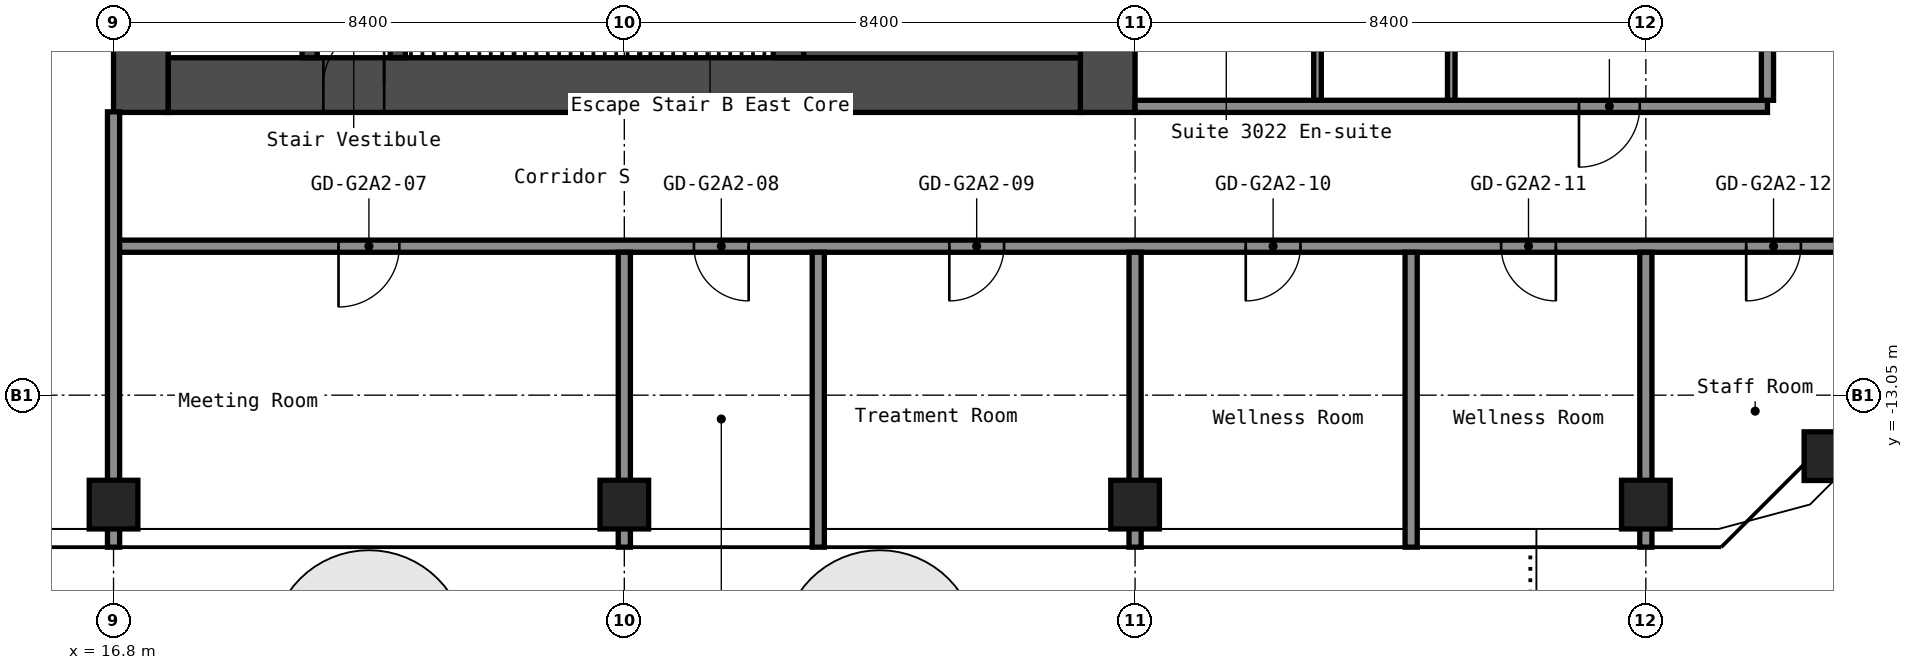
"""IFC4 building model, lengths in metres.
Left out: names, types, materials, properties, quantities, classifications, styles, units other than length and angle.
Written with IfcOpenShell. Run it as: python <this file> out.ifc"""

import sys

from ifc_helpers import new_model, si_unit, direction, frame, frame_2d, origin, origin_2d, place, context, subcontext, project, spatial, rectangle, hollow_rectangle, extrude, element, fill, save


model = new_model("IFC4")
c1 = context("Model", 3, precision=1e-05, world=origin(), true_north=direction((0.0, 1.0)))
c2 = subcontext(c1, "Body", "Model", "MODEL_VIEW")
j1 = project(units=[si_unit("LENGTHUNIT", "METRE"), si_unit("PLANEANGLEUNIT", "RADIAN")], contexts=[c1])
p1 = place(None, origin())
s1 = spatial("IfcSite", under=j1, at=p1, CompositionType="ELEMENT")
p2 = place(p1, origin())
s2 = spatial("IfcBuilding", under=s1, at=p2, CompositionType="ELEMENT")
p3 = place(p2, frame((0.0, 0.0, 107.4)))
s3 = spatial("IfcBuildingStorey", under=s2, at=p3, CompositionType="ELEMENT", Elevation=107.4)
for number, where, z_axis, x_axis in (
    (1, (16.8, -14.85, 0.0), (0.0, 0.0, 1.0), (1.0, 0.0, 0.0)),
    (2, (25.2, -14.85, 0.0), (0.0, 0.0, 1.0), (1.0, 0.0, 0.0)),
    (3, (33.6, -14.85, 0.0), (0.0, 0.0, 1.0), (1.0, 0.0, 0.0)),
    (4, (42.0, -14.85, 0.0), (0.0, 0.0, 1.0), (1.0, 0.0, 0.0)),
    (5, (45.003, -14.053, 0.0), (0.0, 0.0, 1.0), (1.0, 0.0, 0.0)),
):
    element("IfcColumn", number, at=place(p3, frame(where, z_axis=z_axis, x_axis=x_axis)), inside=s3, PredefinedType="COLUMN", context=c2, shape_type="SweptSolid", body=[
        extrude(hollow_rectangle(XDim=0.8, YDim=0.8, WallThickness=0.032, at=origin_2d()), origin(), (0.0, 0.0, 1.0), 2.8),
    ])
p4 = place(p3, frame((17.25, -8.4, 0.0), z_axis=(0.0, 0.0, 1.0), x_axis=(0.0, 1.0, 0.0)))
e6 = element("IfcWall", 6, at=p4, inside=s3, PredefinedType="SHEAR", context=c2, shape_type="SweptSolid", body=[
    extrude(rectangle(XDim=16.8, YDim=0.9, at=frame_2d((8.4, 0.0))), origin(), (0.0, 0.0, 1.0), 2.8),
])
p5 = place(p4, frame((7.6, 0.0, 0.0)))
e7 = element("IfcOpeningElement", 7, at=p5, cuts=e6, PredefinedType="OPENING", context=c2, shape_type="SweptSolid", body=[
    extrude(rectangle(XDim=1.2, YDim=2.1, at=frame_2d((0.6, 1.05))), frame((0.0, 0.46, 0.0), z_axis=(0.0, -1.0, 0.0), x_axis=(1.0, 0.0, 0.0)), (0.0, 0.0, 1.0), 0.92),
])
p6 = place(p3, frame((33.15, -8.4, 0.0), z_axis=(0.0, 0.0, 1.0), x_axis=(0.0, 1.0, 0.0)))
e8 = element("IfcWall", 8, at=p6, inside=s3, PredefinedType="SHEAR", context=c2, shape_type="SweptSolid", body=[
    extrude(rectangle(XDim=16.8, YDim=0.9, at=frame_2d((8.4, 0.0))), origin(), (0.0, 0.0, 1.0), 2.8),
])
p7 = place(p3, frame((17.7, -7.95, 0.0), z_axis=(0.0, 0.0, 1.0), x_axis=(1.0, 0.0, 0.0)))
e9 = element("IfcWall", 9, at=p7, inside=s3, PredefinedType="SHEAR", context=c2, shape_type="SweptSolid", body=[
    extrude(rectangle(XDim=15.0, YDim=0.9, at=frame_2d((7.5, 0.0))), origin(), (0.0, 0.0, 1.0), 2.8),
])
p8 = place(p7, frame((2.55, 0.0, 0.0)))
e10 = element("IfcOpeningElement", 10, at=p8, cuts=e9, PredefinedType="OPENING", context=c2, shape_type="SweptSolid", body=[
    extrude(rectangle(XDim=1.0, YDim=2.1, at=frame_2d((0.5, 1.05))), frame((0.0, 0.46, 0.0), z_axis=(0.0, -1.0, 0.0), x_axis=(1.0, 0.0, 0.0)), (0.0, 0.0, 1.0), 0.92),
])
p9 = place(p3, frame((20.025, -7.5, 0.0), z_axis=(0.0, 0.0, 1.0), x_axis=(0.0, 1.0, 0.0)))
e11 = element("IfcWall", 11, at=p9, inside=s3, PredefinedType="SHEAR", context=c2, shape_type="SweptSolid", body=[
    extrude(rectangle(XDim=6.3, YDim=0.25, at=frame_2d((3.15, 0.0))), origin(), (0.0, 0.0, 1.0), 2.8),
])
p10 = place(p9, frame((2.4, 0.0, 0.0)))
e12 = element("IfcOpeningElement", 12, at=p10, cuts=e11, PredefinedType="OPENING", context=c2, shape_type="SweptSolid", body=[
    extrude(rectangle(XDim=1.0, YDim=2.1, at=frame_2d((0.5, 1.05))), frame((0.0, 0.135, 0.0), z_axis=(0.0, -1.0, 0.0), x_axis=(1.0, 0.0, 0.0)), (0.0, 0.0, 1.0), 0.27),
])
p11 = place(p3, frame((21.475, -7.5, 0.0), z_axis=(0.0, 0.0, 1.0), x_axis=(0.0, 1.0, 0.0)))
e13 = element("IfcWall", 13, at=p11, inside=s3, PredefinedType="SHEAR", context=c2, shape_type="SweptSolid", body=[
    extrude(rectangle(XDim=3.75, YDim=0.25, at=frame_2d((1.875, 0.0))), origin(), (0.0, 0.0, 1.0), 2.8),
])
p12 = place(p11, frame((1.3, 0.0, 0.0)))
e14 = element("IfcOpeningElement", 14, at=p12, cuts=e13, PredefinedType="OPENING", context=c2, shape_type="SweptSolid", body=[
    extrude(rectangle(XDim=1.2, YDim=2.1, at=frame_2d((0.6, 1.05))), frame((0.0, 0.135, 0.0), z_axis=(0.0, -1.0, 0.0), x_axis=(1.0, 0.0, 0.0)), (0.0, 0.0, 1.0), 0.27),
])
p13 = place(p3, frame((27.9, -7.5, 0.0), z_axis=(0.0, 0.0, 1.0), x_axis=(0.0, 1.0, 0.0)))
e15 = element("IfcWall", 15, at=p13, inside=s3, PredefinedType="SHEAR", context=c2, shape_type="SweptSolid", body=[
    extrude(rectangle(XDim=3.75, YDim=0.5, at=frame_2d((1.875, 0.0))), origin(), (0.0, 0.0, 1.0), 2.8),
])
p14 = place(p3, frame((28.15, -6.75, 0.0), z_axis=(0.0, 0.0, 1.0), x_axis=(1.0, 0.0, 0.0)))
e16 = element("IfcWall", 16, at=p14, inside=s3, PredefinedType="SHEAR", context=c2, shape_type="SweptSolid", body=[
    extrude(rectangle(XDim=4.55, YDim=1.5, at=frame_2d((2.275, 0.0))), origin(), (0.0, 0.0, 1.0), 2.8),
])
p15 = place(p3, frame((16.8, -10.6, 0.0), z_axis=(0.0, 0.0, 1.0), x_axis=(1.0, 0.0, 0.0)))
e17 = element("IfcWall", 17, at=p15, inside=s3, PredefinedType="PARTITIONING", context=c2, shape_type="SweptSolid", body=[
    extrude(rectangle(XDim=29.7, YDim=0.2, at=frame_2d((14.85, 0.0))), origin(), (0.0, 0.0, 1.0), 2.8),
])
p16 = place(p15, frame((3.7, 0.0, 0.0)))
e18 = element("IfcOpeningElement", 18, at=p16, cuts=e17, PredefinedType="OPENING", context=c2, shape_type="SweptSolid", body=[
    extrude(rectangle(XDim=1.0, YDim=2.1, at=frame_2d((0.5, 1.05))), frame((0.0, 0.11, 0.0), z_axis=(0.0, -1.0, 0.0), x_axis=(1.0, 0.0, 0.0)), (0.0, 0.0, 1.0), 0.22),
])
p17 = place(p15, frame((9.545, 0.0, 0.0)))
e19 = element("IfcOpeningElement", 19, at=p17, cuts=e17, PredefinedType="OPENING", context=c2, shape_type="SweptSolid", body=[
    extrude(rectangle(XDim=0.9, YDim=2.1, at=frame_2d((0.45, 1.05))), frame((0.0, 0.11, 0.0), z_axis=(0.0, -1.0, 0.0), x_axis=(1.0, 0.0, 0.0)), (0.0, 0.0, 1.0), 0.22),
])
p18 = place(p15, frame((13.745, 0.0, 0.0)))
e20 = element("IfcOpeningElement", 20, at=p18, cuts=e17, PredefinedType="OPENING", context=c2, shape_type="SweptSolid", body=[
    extrude(rectangle(XDim=0.9, YDim=2.1, at=frame_2d((0.45, 1.05))), frame((0.0, 0.11, 0.0), z_axis=(0.0, -1.0, 0.0), x_axis=(1.0, 0.0, 0.0)), (0.0, 0.0, 1.0), 0.22),
])
p19 = place(p15, frame((18.62, 0.0, 0.0)))
e21 = element("IfcOpeningElement", 21, at=p19, cuts=e17, PredefinedType="OPENING", context=c2, shape_type="SweptSolid", body=[
    extrude(rectangle(XDim=0.9, YDim=2.1, at=frame_2d((0.45, 1.05))), frame((0.0, 0.11, 0.0), z_axis=(0.0, -1.0, 0.0), x_axis=(1.0, 0.0, 0.0)), (0.0, 0.0, 1.0), 0.22),
])
p20 = place(p15, frame((22.82, 0.0, 0.0)))
e22 = element("IfcOpeningElement", 22, at=p20, cuts=e17, PredefinedType="OPENING", context=c2, shape_type="SweptSolid", body=[
    extrude(rectangle(XDim=0.9, YDim=2.1, at=frame_2d((0.45, 1.05))), frame((0.0, 0.11, 0.0), z_axis=(0.0, -1.0, 0.0), x_axis=(1.0, 0.0, 0.0)), (0.0, 0.0, 1.0), 0.22),
])
p21 = place(p15, frame((26.85, 0.0, 0.0)))
e23 = element("IfcOpeningElement", 23, at=p21, cuts=e17, PredefinedType="OPENING", context=c2, shape_type="SweptSolid", body=[
    extrude(rectangle(XDim=0.9, YDim=2.1, at=frame_2d((0.45, 1.05))), frame((0.0, 0.11, 0.0), z_axis=(0.0, -1.0, 0.0), x_axis=(1.0, 0.0, 0.0)), (0.0, 0.0, 1.0), 0.22),
])
p22 = place(p3, frame((33.6, -8.3, 0.0), z_axis=(0.0, 0.0, 1.0), x_axis=(1.0, 0.0, 0.0)))
e24 = element("IfcWall", 24, at=p22, inside=s3, PredefinedType="PARTITIONING", context=c2, shape_type="SweptSolid", body=[
    extrude(rectangle(XDim=10.4, YDim=0.2, at=frame_2d((5.2, 0.0))), origin(), (0.0, 0.0, 1.0), 2.8),
])
p23 = place(p22, frame((7.3, 0.0, 0.0)))
e25 = element("IfcOpeningElement", 25, at=p23, cuts=e24, PredefinedType="OPENING", context=c2, shape_type="SweptSolid", body=[
    extrude(rectangle(XDim=1.0, YDim=2.1, at=frame_2d((0.5, 1.05))), frame((0.0, 0.11, 0.0), z_axis=(0.0, -1.0, 0.0), x_axis=(1.0, 0.0, 0.0)), (0.0, 0.0, 1.0), 0.22),
])
p24 = place(p3, frame((16.8, -15.55, 0.0), z_axis=(0.0, 0.0, 1.0), x_axis=(0.0, 1.0, 0.0)))
e26 = element("IfcWall", 26, at=p24, inside=s3, PredefinedType="PARTITIONING", context=c2, shape_type="SweptSolid", body=[
    extrude(rectangle(XDim=7.16, YDim=0.2, at=frame_2d((3.58, 0.0))), origin(), (0.0, 0.0, 1.0), 2.8),
])
for number, where, z_axis, x_axis in (
    (27, (25.2, -15.55, 0.0), (0.0, 0.0, 1.0), (0.0, 1.0, 0.0)),
    (28, (28.39, -15.55, 0.0), (0.0, 0.0, 1.0), (0.0, 1.0, 0.0)),
    (29, (33.6, -15.55, 0.0), (0.0, 0.0, 1.0), (0.0, 1.0, 0.0)),
):
    element("IfcWall", number, at=place(p3, frame(where, z_axis=z_axis, x_axis=x_axis)), inside=s3, PredefinedType="PARTITIONING", context=c2, shape_type="SweptSolid", body=[
        extrude(rectangle(XDim=4.85, YDim=0.2, at=frame_2d((2.425, 0.0))), origin(), (0.0, 0.0, 1.0), 2.8),
    ])
p25 = place(p3, frame((36.6, -8.2, 0.0), z_axis=(0.0, 0.0, 1.0), x_axis=(0.0, 1.0, 0.0)))
e30 = element("IfcWall", 30, at=p25, inside=s3, PredefinedType="PARTITIONING", context=c2, shape_type="SweptSolid", body=[
    extrude(rectangle(XDim=3.1, YDim=0.125, at=frame_2d((1.55, 0.0))), origin(), (0.0, 0.0, 1.0), 2.8),
])
p26 = place(p3, frame((38.14, -15.55, 0.0), z_axis=(0.0, 0.0, 1.0), x_axis=(0.0, 1.0, 0.0)))
e31 = element("IfcWall", 31, at=p26, inside=s3, PredefinedType="PARTITIONING", context=c2, shape_type="SweptSolid", body=[
    extrude(rectangle(XDim=4.85, YDim=0.2, at=frame_2d((2.425, 0.0))), origin(), (0.0, 0.0, 1.0), 2.8),
])
p27 = place(p3, frame((38.8, -8.2, 0.0), z_axis=(0.0, 0.0, 1.0), x_axis=(0.0, 1.0, 0.0)))
e32 = element("IfcWall", 32, at=p27, inside=s3, PredefinedType="PARTITIONING", context=c2, shape_type="SweptSolid", body=[
    extrude(rectangle(XDim=16.4, YDim=0.125, at=frame_2d((8.2, 0.0))), origin(), (0.0, 0.0, 1.0), 2.8),
])
p28 = place(p27, frame((4.05, 0.0, 0.0)))
e33 = element("IfcOpeningElement", 33, at=p28, cuts=e32, PredefinedType="OPENING", context=c2, shape_type="SweptSolid", body=[
    extrude(rectangle(XDim=0.9, YDim=2.1, at=frame_2d((0.45, 1.05))), frame((0.0, 0.073, 0.0), z_axis=(0.0, -1.0, 0.0), x_axis=(1.0, 0.0, 0.0)), (0.0, 0.0, 1.0), 0.145),
])
p29 = place(p27, frame((11.45, 0.0, 0.0)))
e34 = element("IfcOpeningElement", 34, at=p29, cuts=e32, PredefinedType="OPENING", context=c2, shape_type="SweptSolid", body=[
    extrude(rectangle(XDim=0.9, YDim=2.1, at=frame_2d((0.45, 1.05))), frame((0.0, 0.073, 0.0), z_axis=(0.0, -1.0, 0.0), x_axis=(1.0, 0.0, 0.0)), (0.0, 0.0, 1.0), 0.145),
])
p30 = place(p3, frame((42.0, -15.55, 0.0), z_axis=(0.0, 0.0, 1.0), x_axis=(0.0, 1.0, 0.0)))
e35 = element("IfcWall", 35, at=p30, inside=s3, PredefinedType="PARTITIONING", context=c2, shape_type="SweptSolid", body=[
    extrude(rectangle(XDim=4.85, YDim=0.2, at=frame_2d((2.425, 0.0))), origin(), (0.0, 0.0, 1.0), 2.8),
])
p31 = place(p3, frame((44.0, -8.2, 0.0), z_axis=(0.0, 0.0, 1.0), x_axis=(0.0, 1.0, 0.0)))
e36 = element("IfcWall", 36, at=p31, inside=s3, PredefinedType="PARTITIONING", context=c2, shape_type="SweptSolid", body=[
    extrude(rectangle(XDim=16.4, YDim=0.2, at=frame_2d((8.2, 0.0))), origin(), (0.0, 0.0, 1.0), 2.8),
])
p32 = place(p8, origin())
e37 = element("IfcDoor", 37, at=p32, inside=s3, OperationType="SINGLE_SWING_LEFT", PredefinedType="DOOR", context=c2, shape_type="SweptSolid", body=[
    extrude(rectangle(XDim=1.0, YDim=2.1, at=frame_2d((0.5, 1.05))), frame((0.0, 0.025, 0.0), z_axis=(0.0, -1.0, 0.0), x_axis=(1.0, 0.0, 0.0)), (0.0, 0.0, 1.0), 0.05),
])
fill(e10, e37)
p33 = place(p16, origin())
e38 = element("IfcDoor", 38, at=p33, inside=s3, OperationType="SINGLE_SWING_LEFT", PredefinedType="DOOR", context=c2, shape_type="SweptSolid", body=[
    extrude(rectangle(XDim=1.0, YDim=2.1, at=frame_2d((0.5, 1.05))), frame((0.0, 0.025, 0.0), z_axis=(0.0, -1.0, 0.0), x_axis=(1.0, 0.0, 0.0)), (0.0, 0.0, 1.0), 0.05),
])
fill(e18, e38)
p34 = place(p17, origin())
e39 = element("IfcDoor", 39, at=p34, inside=s3, OperationType="SINGLE_SWING_RIGHT", PredefinedType="DOOR", context=c2, shape_type="SweptSolid", body=[
    extrude(rectangle(XDim=0.9, YDim=2.1, at=frame_2d((0.45, 1.05))), frame((0.0, 0.025, 0.0), z_axis=(0.0, -1.0, 0.0), x_axis=(1.0, 0.0, 0.0)), (0.0, 0.0, 1.0), 0.05),
])
fill(e19, e39)
p35 = place(p18, origin())
e40 = element("IfcDoor", 40, at=p35, inside=s3, OperationType="SINGLE_SWING_LEFT", PredefinedType="DOOR", context=c2, shape_type="SweptSolid", body=[
    extrude(rectangle(XDim=0.9, YDim=2.1, at=frame_2d((0.45, 1.05))), frame((0.0, 0.025, 0.0), z_axis=(0.0, -1.0, 0.0), x_axis=(1.0, 0.0, 0.0)), (0.0, 0.0, 1.0), 0.05),
])
fill(e20, e40)
p36 = place(p19, origin())
e41 = element("IfcDoor", 41, at=p36, inside=s3, OperationType="SINGLE_SWING_LEFT", PredefinedType="DOOR", context=c2, shape_type="SweptSolid", body=[
    extrude(rectangle(XDim=0.9, YDim=2.1, at=frame_2d((0.45, 1.05))), frame((0.0, 0.025, 0.0), z_axis=(0.0, -1.0, 0.0), x_axis=(1.0, 0.0, 0.0)), (0.0, 0.0, 1.0), 0.05),
])
fill(e21, e41)
p37 = place(p20, origin())
e42 = element("IfcDoor", 42, at=p37, inside=s3, OperationType="SINGLE_SWING_RIGHT", PredefinedType="DOOR", context=c2, shape_type="SweptSolid", body=[
    extrude(rectangle(XDim=0.9, YDim=2.1, at=frame_2d((0.45, 1.05))), frame((0.0, 0.025, 0.0), z_axis=(0.0, -1.0, 0.0), x_axis=(1.0, 0.0, 0.0)), (0.0, 0.0, 1.0), 0.05),
])
fill(e22, e42)
p38 = place(p21, origin())
e43 = element("IfcDoor", 43, at=p38, inside=s3, OperationType="SINGLE_SWING_LEFT", PredefinedType="DOOR", context=c2, shape_type="SweptSolid", body=[
    extrude(rectangle(XDim=0.9, YDim=2.1, at=frame_2d((0.45, 1.05))), frame((0.0, 0.025, 0.0), z_axis=(0.0, -1.0, 0.0), x_axis=(1.0, 0.0, 0.0)), (0.0, 0.0, 1.0), 0.05),
])
fill(e23, e43)
p39 = place(p23, origin())
e44 = element("IfcDoor", 44, at=p39, inside=s3, OperationType="SINGLE_SWING_LEFT", PredefinedType="DOOR", context=c2, shape_type="SweptSolid", body=[
    extrude(rectangle(XDim=1.0, YDim=2.1, at=frame_2d((0.5, 1.05))), frame((0.0, 0.025, 0.0), z_axis=(0.0, -1.0, 0.0), x_axis=(1.0, 0.0, 0.0)), (0.0, 0.0, 1.0), 0.05),
])
fill(e25, e44)
save(model, sys.argv[1])
